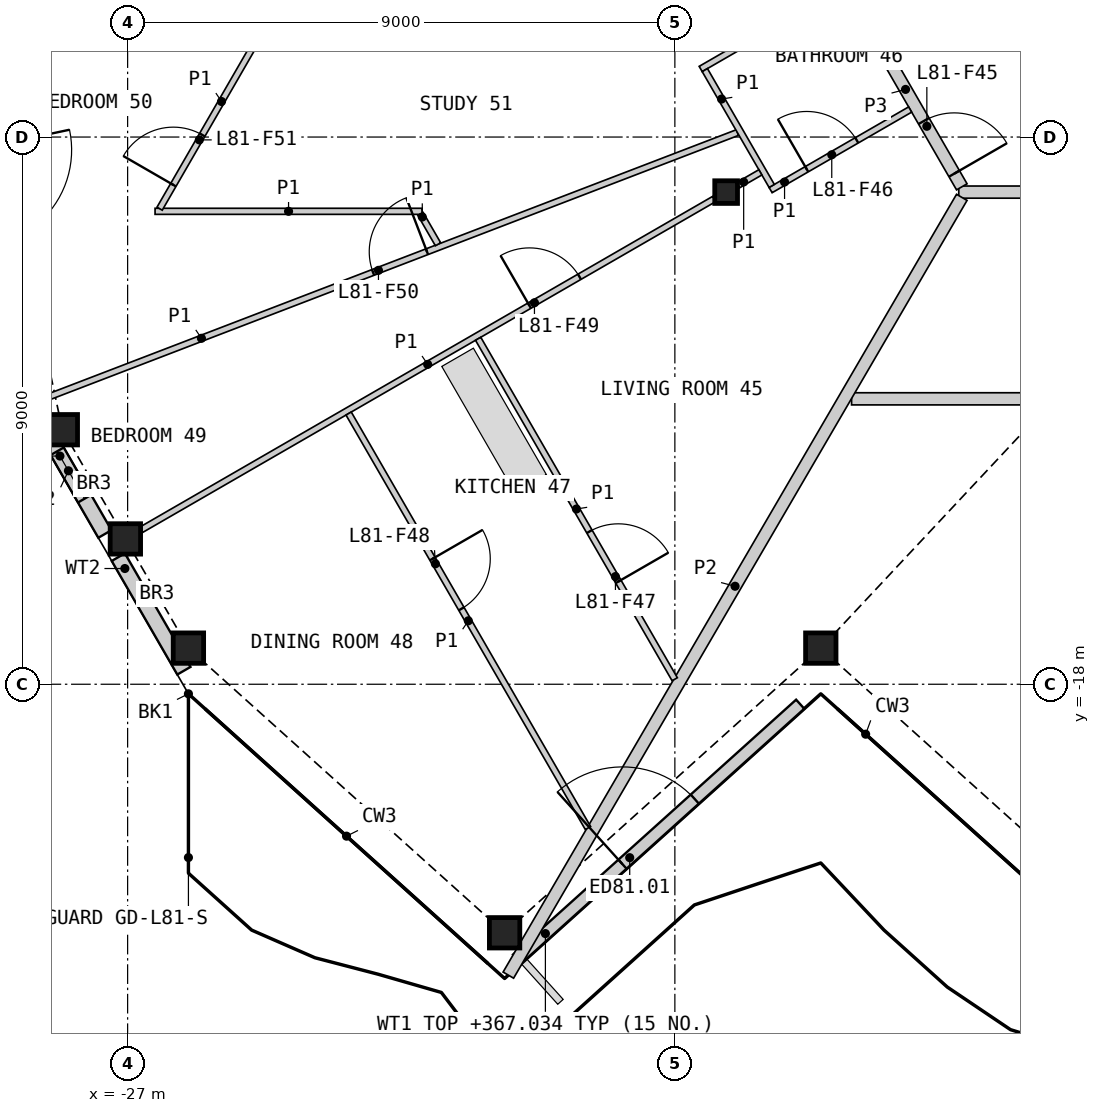
"""IFC4 building model, lengths in metres.
Left out: names, types, materials, properties, quantities, classifications, styles, units other than length and angle.
Written with IfcOpenShell. Run it as: python <this file> out.ifc"""

import sys

from ifc_helpers import new_model, si_unit, direction, frame, frame_2d, origin, origin_2d, place, context, subcontext, project, spatial, rectangle, hollow_rectangle, i_section, extrude, element, fill, save


model = new_model("IFC4")
c1 = context("Model", 3, precision=1e-05, world=origin(), true_north=direction((0.0, 1.0)))
c2 = subcontext(c1, "Body", "Model", "MODEL_VIEW")
j1 = project(units=[si_unit("LENGTHUNIT", "METRE"), si_unit("PLANEANGLEUNIT", "RADIAN")], contexts=[c1])
p1 = place(None, origin())
s1 = spatial("IfcSite", under=j1, at=p1, CompositionType="ELEMENT")
p2 = place(p1, origin())
s2 = spatial("IfcBuilding", under=s1, at=p2, CompositionType="ELEMENT")
p3 = place(p2, frame((0.0, 0.0, 364.4)))
s3 = spatial("IfcBuildingStorey", under=s2, at=p3, CompositionType="ELEMENT", Elevation=364.4)
for number, where, z_axis, x_axis in (
    (1, (-26.0, -17.406, 0.0), (0.0, 0.0, 1.0), (1.0, 0.0, 0.0)),
    (2, (-20.8, -22.088, 0.0), (0.0, 0.0, 1.0), (1.0, 0.0, 0.0)),
    (3, (-15.6, -17.406, 0.0), (0.0, 0.0, 1.0), (1.0, 0.0, 0.0)),
    (4, (-28.074, -13.814, 0.0), (0.0, 0.0, 1.0), (1.0, 0.0, 0.0)),
    (5, (-27.037, -15.61, 0.0), (0.0, 0.0, 1.0), (1.0, 0.0, 0.0)),
):
    element("IfcColumn", number, at=place(p3, frame(where, z_axis=z_axis, x_axis=x_axis)), inside=s3, PredefinedType="COLUMN", context=c2, shape_type="SweptSolid", body=[
        extrude(hollow_rectangle(XDim=0.5, YDim=0.5, WallThickness=0.03, at=origin_2d()), origin(), (0.0, 0.0, 1.0), 3.4),
    ])
p4 = place(p3, frame((-17.157, -9.906, 0.0), z_axis=(0.0, 0.0, 1.0), x_axis=(1.0, 0.0, 0.0)))
e6 = element("IfcColumn", 6, at=p4, inside=s3, PredefinedType="COLUMN", context=c2, shape_type="SweptSolid", body=[
    extrude(i_section(OverallWidth=0.374, OverallDepth=0.372, WebThickness=0.016, FlangeThickness=0.026, at=origin_2d()), origin(), (0.0, 0.0, 1.0), 3.4),
])
p5 = place(p3, frame((-20.595, -22.52, 0.0), z_axis=(0.0, 0.0, 1.0), x_axis=(0.743137181878, 0.669139095339, 0.0)))
e7 = element("IfcWall", 7, at=p5, inside=s3, PredefinedType="SOLIDWALL", context=c2, shape_type="SweptSolid", body=[
    extrude(rectangle(XDim=6.265, YDim=0.2, at=frame_2d((3.133, 0.0))), origin(), (0.0, 0.0, 1.0), 2.634),
])
p6 = place(p5, frame((2.333, 0.0, 0.0)))
e8 = element("IfcOpeningElement", 8, at=p6, cuts=e7, PredefinedType="OPENING", context=c2, shape_type="SweptSolid", body=[
    extrude(rectangle(XDim=1.6, YDim=2.25, at=frame_2d((0.8, 1.125))), frame((0.0, 0.11, 0.0), z_axis=(0.0, -1.0, 0.0), x_axis=(1.0, 0.0, 0.0)), (0.0, 0.0, 1.0), 0.22),
])
p7 = place(p3, frame((-28.573, -13.45, 0.0), z_axis=(0.0, 0.0, 1.0), x_axis=(0.499969057507, -0.866043267704, 0.0)))
e9 = element("IfcWall", 9, at=p7, inside=s3, PredefinedType="SOLIDWALL", context=c2, shape_type="SweptSolid", body=[
    extrude(rectangle(XDim=2.4, YDim=0.25, at=frame_2d((1.2, 0.0))), origin(), (0.0, 0.0, 1.0), 2.634),
])
p8 = place(p7, frame((0.83, 0.0, 0.6)))
e10 = element("IfcOpeningElement", 10, at=p8, cuts=e9, PredefinedType="OPENING", context=c2, shape_type="SweptSolid", body=[
    extrude(rectangle(XDim=0.9, YDim=1.8, at=frame_2d((0.45, 0.9))), frame((0.0, 0.135, 0.0), z_axis=(0.0, -1.0, 0.0), x_axis=(1.0, 0.0, 0.0)), (0.0, 0.0, 1.0), 0.27),
])
p9 = place(p3, frame((-27.153, -15.91, 0.0), z_axis=(0.0, 0.0, 1.0), x_axis=(0.50000982419, -0.866019731711, 0.0)))
e11 = element("IfcWall", 11, at=p9, inside=s3, PredefinedType="SOLIDWALL", context=c2, shape_type="SweptSolid", body=[
    extrude(rectangle(XDim=2.157, YDim=0.25, at=frame_2d((1.079, 0.0))), origin(), (0.0, 0.0, 1.0), 2.634),
])
p10 = place(p3, frame((-13.331, -9.906, 0.0), z_axis=(0.0, 0.0, 1.0), x_axis=(1.0, 0.0, 0.0)))
e12 = element("IfcWall", 12, at=p10, inside=s3, PredefinedType="PARTITIONING", context=c2, shape_type="SweptSolid", body=[
    extrude(rectangle(XDim=4.555, YDim=0.2, at=frame_2d((2.278, 0.0))), origin(), (0.0, 0.0, 1.0), 3.1),
])
p11 = place(p3, frame((-15.131, -6.614, 0.0), z_axis=(0.0, 0.0, 1.0), x_axis=(0.499948957823, -0.866054870994, 0.0)))
e13 = element("IfcWall", 13, at=p11, inside=s3, PredefinedType="PARTITIONING", context=c2, shape_type="SweptSolid", body=[
    extrude(rectangle(XDim=3.701, YDim=0.2, at=frame_2d((1.851, 0.0))), origin(), (0.0, 0.0, 1.0), 3.1),
])
p12 = place(p11, frame((2.451, 0.0, 0.0)))
e14 = element("IfcOpeningElement", 14, at=p12, cuts=e13, PredefinedType="OPENING", context=c2, shape_type="SweptSolid", body=[
    extrude(rectangle(XDim=1.0, YDim=2.1, at=frame_2d((0.5, 1.05))), frame((0.0, 0.11, 0.0), z_axis=(0.0, -1.0, 0.0), x_axis=(1.0, 0.0, 0.0)), (0.0, 0.0, 1.0), 0.22),
])
p13 = place(p3, frame((-15.094, -13.306, 0.0), z_axis=(0.0, 0.0, 1.0), x_axis=(1.0, 0.0, 0.0)))
e15 = element("IfcWall", 15, at=p13, inside=s3, PredefinedType="PARTITIONING", context=c2, shape_type="SweptSolid", body=[
    extrude(rectangle(XDim=14.994, YDim=0.2, at=frame_2d((7.497, 0.0))), origin(), (0.0, 0.0, 1.0), 2.33),
])
p14 = place(p13, frame((6.27, 0.0, 0.0)))
e16 = element("IfcOpeningElement", 16, at=p14, cuts=e15, PredefinedType="OPENING", context=c2, shape_type="SweptSolid", body=[
    extrude(rectangle(XDim=0.95, YDim=2.1, at=frame_2d((0.475, 1.05))), frame((0.0, 0.11, 0.0), z_axis=(0.0, -1.0, 0.0), x_axis=(1.0, 0.0, 0.0)), (0.0, 0.0, 1.0), 0.22),
])
p15 = place(p3, frame((-20.739, -22.784, 0.0), z_axis=(0.0, 0.0, 1.0), x_axis=(0.50362599185, 0.863921790635, 0.0)))
e17 = element("IfcWall", 17, at=p15, inside=s3, PredefinedType="PARTITIONING", context=c2, shape_type="SweptSolid", body=[
    extrude(rectangle(XDim=14.807, YDim=0.2, at=frame_2d((7.404, 0.0))), origin(), (0.0, 0.0, 1.0), 2.33),
])
p16 = place(p3, frame((-28.725, -13.438, 0.0), z_axis=(0.0, 0.0, 1.0), x_axis=(0.933580312145, 0.358368247444, 0.0)))
e18 = element("IfcWall", 18, at=p16, inside=s3, PredefinedType="PARTITIONING", context=c2, shape_type="SweptSolid", body=[
    extrude(rectangle(XDim=12.59, YDim=0.1, at=frame_2d((6.295, 0.0))), origin(), (0.0, 0.0, 1.0), 2.33),
])
p17 = place(p16, frame((6.171, 0.0, 0.0)))
e19 = element("IfcOpeningElement", 19, at=p17, cuts=e18, PredefinedType="OPENING", context=c2, shape_type="SweptSolid", body=[
    extrude(rectangle(XDim=0.95, YDim=2.1, at=frame_2d((0.475, 1.05))), frame((0.0, 0.06, 0.0), z_axis=(0.0, -1.0, 0.0), x_axis=(1.0, 0.0, 0.0)), (0.0, 0.0, 1.0), 0.12),
])
p18 = place(p3, frame((-26.777, -15.46, 0.0), z_axis=(0.0, 0.0, 1.0), x_axis=(0.866019680922, 0.500009912158, 0.0)))
e20 = element("IfcWall", 20, at=p18, inside=s3, PredefinedType="PARTITIONING", context=c2, shape_type="SweptSolid", body=[
    extrude(rectangle(XDim=10.881, YDim=0.1, at=frame_2d((5.44, 0.0))), origin(), (0.0, 0.0, 1.0), 2.33),
])
p19 = place(p18, frame((7.373, 0.0, 0.0)))
e21 = element("IfcOpeningElement", 21, at=p19, cuts=e20, PredefinedType="OPENING", context=c2, shape_type="SweptSolid", body=[
    extrude(rectangle(XDim=0.95, YDim=2.1, at=frame_2d((0.475, 1.05))), frame((0.0, 0.06, 0.0), z_axis=(0.0, -1.0, 0.0), x_axis=(1.0, 0.0, 0.0)), (0.0, 0.0, 1.0), 0.12),
])
p20 = place(p3, frame((-23.365, -13.548, 0.0), z_axis=(0.0, 0.0, 1.0), x_axis=(0.500011483804, -0.866018773506, 0.0)))
e22 = element("IfcWall", 22, at=p20, inside=s3, PredefinedType="PARTITIONING", context=c2, shape_type="SweptSolid", body=[
    extrude(rectangle(XDim=7.872, YDim=0.1, at=frame_2d((3.936, 0.0))), origin(), (0.0, 0.0, 1.0), 2.33),
])
p21 = place(p20, frame((2.759, 0.0, 0.0)))
e23 = element("IfcOpeningElement", 23, at=p21, cuts=e22, PredefinedType="OPENING", context=c2, shape_type="SweptSolid", body=[
    extrude(rectangle(XDim=0.95, YDim=2.1, at=frame_2d((0.475, 1.05))), frame((0.0, 0.06, 0.0), z_axis=(0.0, -1.0, 0.0), x_axis=(1.0, 0.0, 0.0)), (0.0, 0.0, 1.0), 0.12),
])
p22 = place(p3, frame((-21.235, -12.318, 0.0), z_axis=(0.0, 0.0, 1.0), x_axis=(0.500008973052, -0.866020223129, 0.0)))
e24 = element("IfcWall", 24, at=p22, inside=s3, PredefinedType="PARTITIONING", context=c2, shape_type="SweptSolid", body=[
    extrude(rectangle(XDim=6.466, YDim=0.1, at=frame_2d((3.233, 0.0))), origin(), (0.0, 0.0, 1.0), 2.33),
])
p23 = place(p22, frame((3.661, 0.0, 0.0)))
e25 = element("IfcOpeningElement", 25, at=p23, cuts=e24, PredefinedType="OPENING", context=c2, shape_type="SweptSolid", body=[
    extrude(rectangle(XDim=0.95, YDim=2.1, at=frame_2d((0.475, 1.05))), frame((0.0, 0.06, 0.0), z_axis=(0.0, -1.0, 0.0), x_axis=(1.0, 0.0, 0.0)), (0.0, 0.0, 1.0), 0.12),
])
p24 = place(p3, frame((-26.549, -10.222, 0.0), z_axis=(0.0, 0.0, 1.0), x_axis=(1.0, 0.0, 0.0)))
e26 = element("IfcWall", 26, at=p24, inside=s3, PredefinedType="PARTITIONING", context=c2, shape_type="SweptSolid", body=[
    extrude(rectangle(XDim=4.391, YDim=0.1, at=frame_2d((2.195, 0.0))), origin(), (0.0, 0.0, 1.0), 2.33),
])
p25 = place(p3, frame((-26.474, -10.178, 0.0), z_axis=(0.0, 0.0, 1.0), x_axis=(0.499995835917, 0.866027807905, 0.0)))
e27 = element("IfcWall", 27, at=p25, inside=s3, PredefinedType="PARTITIONING", context=c2, shape_type="SweptSolid", body=[
    extrude(rectangle(XDim=4.071, YDim=0.1, at=frame_2d((2.036, 0.0))), origin(), (0.0, 0.0, 1.0), 2.33),
])
p26 = place(p25, frame((0.452, 0.0, 0.0)))
e28 = element("IfcOpeningElement", 28, at=p26, cuts=e27, PredefinedType="OPENING", context=c2, shape_type="SweptSolid", body=[
    extrude(rectangle(XDim=0.95, YDim=2.1, at=frame_2d((0.475, 1.05))), frame((0.0, 0.06, 0.0), z_axis=(0.0, -1.0, 0.0), x_axis=(1.0, 0.0, 0.0)), (0.0, 0.0, 1.0), 0.12),
])
p27 = place(p3, frame((-17.575, -7.881, 0.0), z_axis=(0.0, 0.0, 1.0), x_axis=(0.866013657776, 0.500020344131, 0.0)))
e29 = element("IfcWall", 29, at=p27, inside=s3, PredefinedType="PARTITIONING", context=c2, shape_type="SweptSolid", body=[
    extrude(rectangle(XDim=2.625, YDim=0.1, at=frame_2d((1.312, 0.0))), origin(), (0.0, 0.0, 1.0), 2.33),
])
p28 = place(p3, frame((-16.426, -9.872, 0.0), z_axis=(0.0, 0.0, 1.0), x_axis=(0.866029095148, 0.499993606316, 0.0)))
e30 = element("IfcWall", 30, at=p28, inside=s3, PredefinedType="PARTITIONING", context=c2, shape_type="SweptSolid", body=[
    extrude(rectangle(XDim=2.65, YDim=0.1, at=frame_2d((1.325, 0.0))), origin(), (0.0, 0.0, 1.0), 2.33),
])
p29 = place(p28, frame((0.686, 0.0, 0.0)))
e31 = element("IfcOpeningElement", 31, at=p29, cuts=e30, PredefinedType="OPENING", context=c2, shape_type="SweptSolid", body=[
    extrude(rectangle(XDim=0.95, YDim=2.1, at=frame_2d((0.475, 1.05))), frame((0.0, 0.06, 0.0), z_axis=(0.0, -1.0, 0.0), x_axis=(1.0, 0.0, 0.0)), (0.0, 0.0, 1.0), 0.12),
])
p30 = place(p3, frame((-17.507, -7.899, 0.0), z_axis=(0.0, 0.0, 1.0), x_axis=(0.499946605688, -0.86605622881, 0.0)))
e32 = element("IfcWall", 32, at=p30, inside=s3, PredefinedType="PARTITIONING", context=c2, shape_type="SweptSolid", body=[
    extrude(rectangle(XDim=2.2, YDim=0.1, at=frame_2d((1.1, 0.0))), origin(), (0.0, 0.0, 1.0), 2.33),
])
p31 = place(p3, frame((-22.183, -10.265, 0.0), z_axis=(0.0, 0.0, 1.0), x_axis=(0.500016142392, -0.86601608377, 0.0)))
e33 = element("IfcWall", 33, at=p31, inside=s3, PredefinedType="PARTITIONING", context=c2, shape_type="SweptSolid", body=[
    extrude(rectangle(XDim=0.576, YDim=0.1, at=frame_2d((0.288, 0.0))), origin(), (0.0, 0.0, 1.0), 2.33),
])
p32 = place(p3, frame((-16.96, -9.792, 0.0), z_axis=(0.0, 0.0, 1.0), x_axis=(0.866137484628, 0.499805820016, 0.0)))
e34 = element("IfcWall", 34, at=p32, inside=s3, PredefinedType="PARTITIONING", context=c2, shape_type="SweptSolid", body=[
    extrude(rectangle(XDim=0.423, YDim=0.1, at=frame_2d((0.211, 0.0))), origin(), (0.0, 0.0, 1.0), 2.33),
])
p33 = place(p6, origin())
e35 = element("IfcDoor", 35, at=p33, inside=s3, OperationType="DOUBLE_DOOR_SINGLE_SWING", PredefinedType="DOOR", context=c2, shape_type="SweptSolid", body=[
    extrude(rectangle(XDim=1.6, YDim=2.25, at=frame_2d((0.8, 1.125))), frame((0.0, 0.025, 0.0), z_axis=(0.0, -1.0, 0.0), x_axis=(1.0, 0.0, 0.0)), (0.0, 0.0, 1.0), 0.05),
])
fill(e8, e35)
p34 = place(p8, origin())
e36 = element("IfcWindow", 36, at=p34, inside=s3, PartitioningType="SINGLE_PANEL", PredefinedType="WINDOW", context=c2, shape_type="SweptSolid", body=[
    extrude(rectangle(XDim=0.9, YDim=1.8, at=frame_2d((0.45, 0.9))), frame((0.0, 0.03, 0.0), z_axis=(0.0, -1.0, 0.0), x_axis=(1.0, 0.0, 0.0)), (0.0, 0.0, 1.0), 0.06),
])
fill(e10, e36)
p35 = place(p12, origin())
e37 = element("IfcDoor", 37, at=p35, inside=s3, OperationType="SINGLE_SWING_RIGHT", PredefinedType="DOOR", context=c2, shape_type="SweptSolid", body=[
    extrude(rectangle(XDim=1.0, YDim=2.1, at=frame_2d((0.5, 1.05))), frame((0.0, 0.025, 0.0), z_axis=(0.0, -1.0, 0.0), x_axis=(1.0, 0.0, 0.0)), (0.0, 0.0, 1.0), 0.05),
])
fill(e14, e37)
p36 = place(p29, origin())
e38 = element("IfcDoor", 38, at=p36, inside=s3, OperationType="SINGLE_SWING_LEFT", PredefinedType="DOOR", context=c2, shape_type="SweptSolid", body=[
    extrude(rectangle(XDim=0.95, YDim=2.1, at=frame_2d((0.475, 1.05))), frame((0.0, 0.025, 0.0), z_axis=(0.0, -1.0, 0.0), x_axis=(1.0, 0.0, 0.0)), (0.0, 0.0, 1.0), 0.05),
])
fill(e31, e38)
p37 = place(p23, origin())
e39 = element("IfcDoor", 39, at=p37, inside=s3, OperationType="SINGLE_SWING_RIGHT", PredefinedType="DOOR", context=c2, shape_type="SweptSolid", body=[
    extrude(rectangle(XDim=0.95, YDim=2.1, at=frame_2d((0.475, 1.05))), frame((0.0, 0.025, 0.0), z_axis=(0.0, -1.0, 0.0), x_axis=(1.0, 0.0, 0.0)), (0.0, 0.0, 1.0), 0.05),
])
fill(e25, e39)
p38 = place(p21, origin())
e40 = element("IfcDoor", 40, at=p38, inside=s3, OperationType="SINGLE_SWING_LEFT", PredefinedType="DOOR", context=c2, shape_type="SweptSolid", body=[
    extrude(rectangle(XDim=0.95, YDim=2.1, at=frame_2d((0.475, 1.05))), frame((0.0, 0.025, 0.0), z_axis=(0.0, -1.0, 0.0), x_axis=(1.0, 0.0, 0.0)), (0.0, 0.0, 1.0), 0.05),
])
fill(e23, e40)
p39 = place(p19, origin())
e41 = element("IfcDoor", 41, at=p39, inside=s3, OperationType="SINGLE_SWING_LEFT", PredefinedType="DOOR", context=c2, shape_type="SweptSolid", body=[
    extrude(rectangle(XDim=0.95, YDim=2.1, at=frame_2d((0.475, 1.05))), frame((0.0, 0.025, 0.0), z_axis=(0.0, -1.0, 0.0), x_axis=(1.0, 0.0, 0.0)), (0.0, 0.0, 1.0), 0.05),
])
fill(e21, e41)
p40 = place(p17, origin())
e42 = element("IfcDoor", 42, at=p40, inside=s3, OperationType="SINGLE_SWING_RIGHT", PredefinedType="DOOR", context=c2, shape_type="SweptSolid", body=[
    extrude(rectangle(XDim=0.95, YDim=2.1, at=frame_2d((0.475, 1.05))), frame((0.0, 0.025, 0.0), z_axis=(0.0, -1.0, 0.0), x_axis=(1.0, 0.0, 0.0)), (0.0, 0.0, 1.0), 0.05),
])
fill(e19, e42)
p41 = place(p26, origin())
e43 = element("IfcDoor", 43, at=p41, inside=s3, OperationType="SINGLE_SWING_LEFT", PredefinedType="DOOR", context=c2, shape_type="SweptSolid", body=[
    extrude(rectangle(XDim=0.95, YDim=2.1, at=frame_2d((0.475, 1.05))), frame((0.0, 0.025, 0.0), z_axis=(0.0, -1.0, 0.0), x_axis=(1.0, 0.0, 0.0)), (0.0, 0.0, 1.0), 0.05),
])
fill(e28, e43)
save(model, sys.argv[1])
